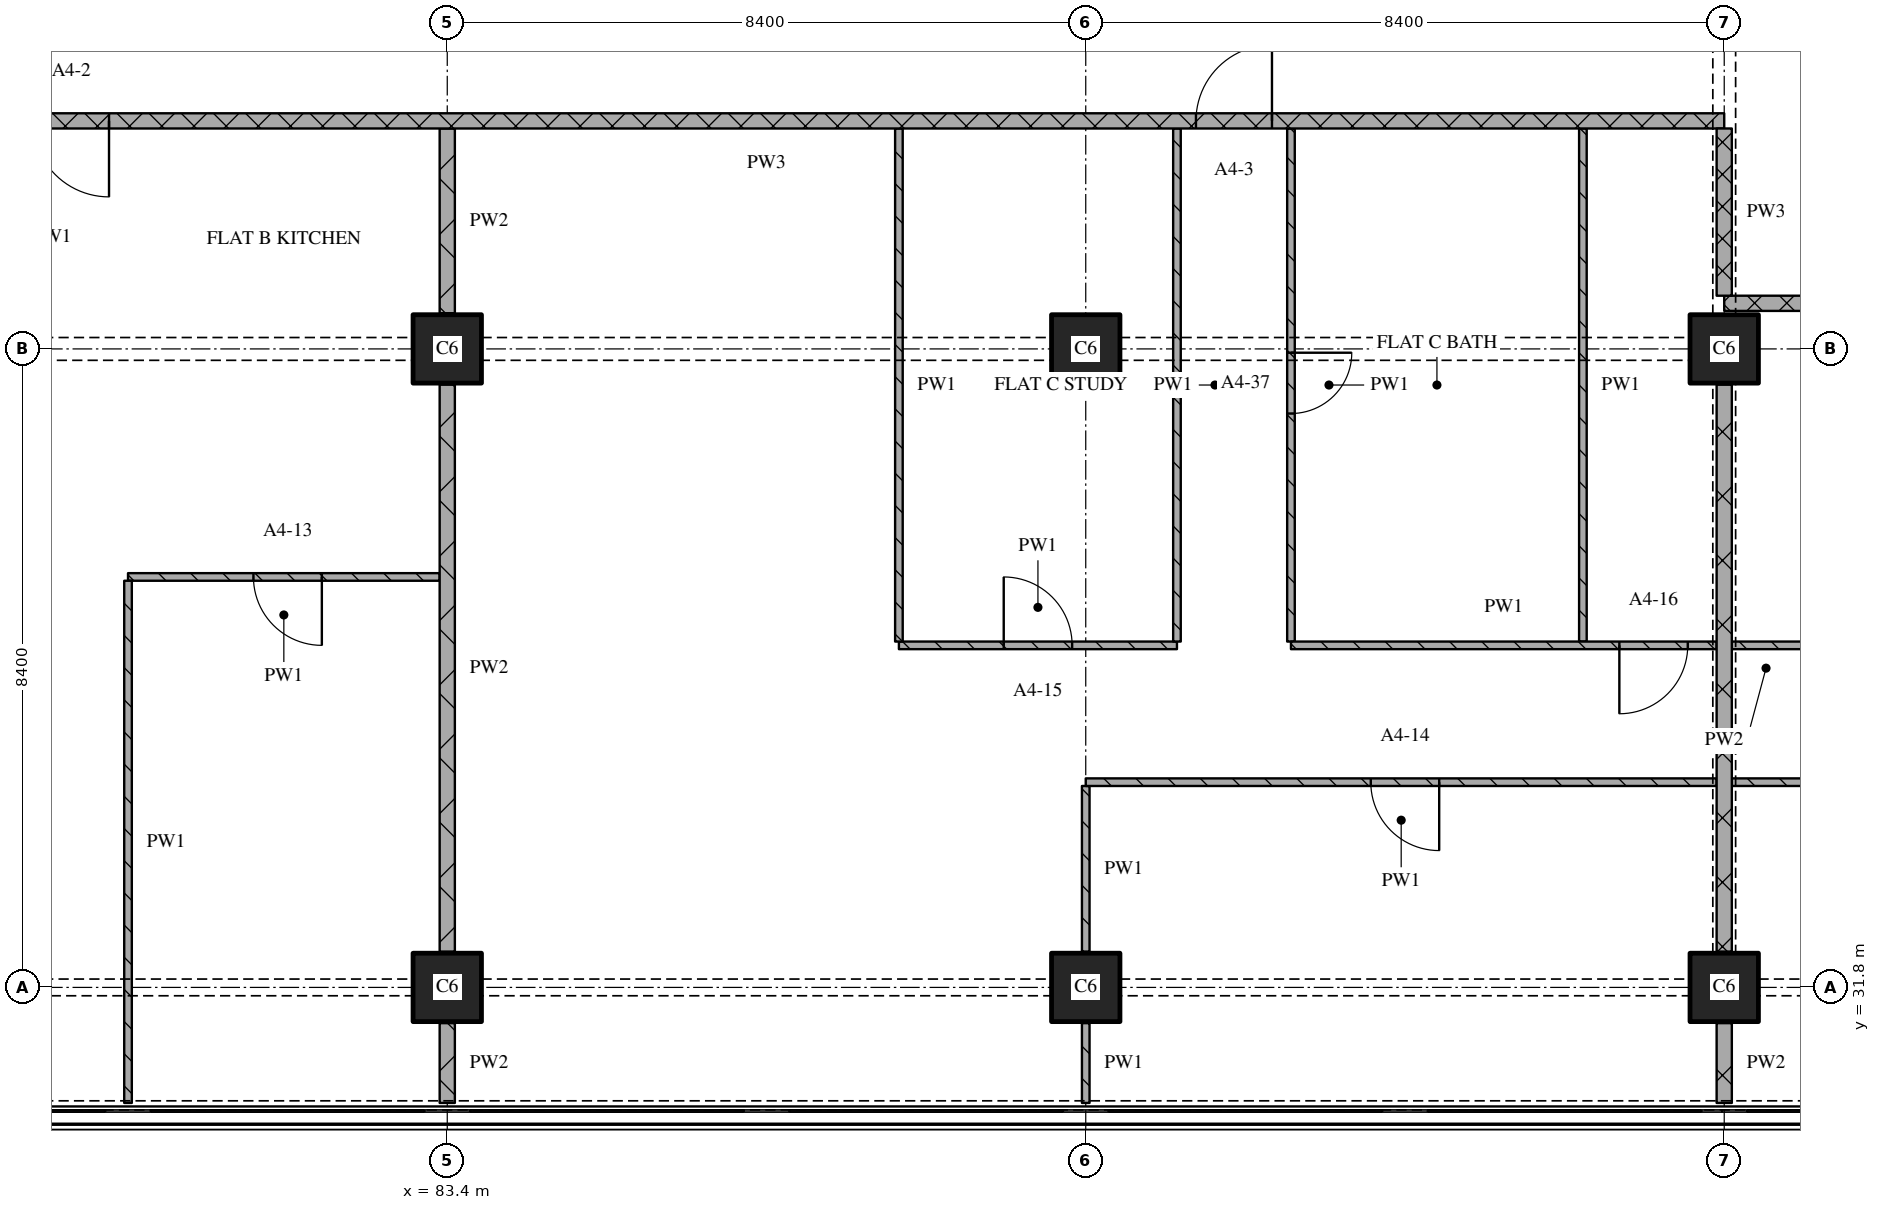
"""IFC4 building model, lengths in metres.
Left out: names, types, materials, properties, quantities, classifications, styles, units other than length and angle.
Written with IfcOpenShell. Run it as: python <this file> out.ifc"""

import sys

from ifc_helpers import new_model, si_unit, direction, frame, frame_2d, origin, origin_2d, place, context, subcontext, project, spatial, rectangle, extrude, element, fill, save


model = new_model("IFC4")
c1 = context("Model", 3, precision=1e-05, world=origin(), true_north=direction((0.0, 1.0)))
c2 = subcontext(c1, "Body", "Model", "MODEL_VIEW")
j1 = project(units=[si_unit("LENGTHUNIT", "METRE"), si_unit("PLANEANGLEUNIT", "RADIAN")], contexts=[c1])
p1 = place(None, origin())
s1 = spatial("IfcSite", under=j1, at=p1, CompositionType="ELEMENT")
p2 = place(p1, origin())
s2 = spatial("IfcBuilding", under=s1, at=p2, CompositionType="ELEMENT")
p3 = place(p2, frame((0.0, 0.0, 73.2)))
s3 = spatial("IfcBuildingStorey", under=s2, at=p3, CompositionType="ELEMENT", Elevation=73.2)
for number, where, z_axis, x_axis in (
    (1, (83.4, 31.8, 0.0), (0.0, 0.0, 1.0), (1.0, 0.0, 0.0)),
    (2, (83.4, 40.2, 0.0), (0.0, 0.0, 1.0), (1.0, 0.0, 0.0)),
    (3, (91.8, 31.8, 0.0), (0.0, 0.0, 1.0), (1.0, 0.0, 0.0)),
    (4, (91.8, 40.2, 0.0), (0.0, 0.0, 1.0), (1.0, 0.0, 0.0)),
    (5, (100.2, 31.8, 0.0), (0.0, 0.0, 1.0), (1.0, 0.0, 0.0)),
    (6, (100.2, 40.2, 0.0), (0.0, 0.0, 1.0), (1.0, 0.0, 0.0)),
):
    element("IfcColumn", number, at=place(p3, frame(where, z_axis=z_axis, x_axis=x_axis)), inside=s3, PredefinedType="COLUMN", context=c2, shape_type="SweptSolid", body=[
        extrude(rectangle(XDim=0.9, YDim=0.9, at=origin_2d()), origin(), (0.0, 0.0, 1.0), 3.6),
    ])
p4 = place(p3, frame((89.342, 36.3, 0.0), z_axis=(0.0, 0.0, 1.0), x_axis=(1.0, 0.0, 0.0)))
e7 = element("IfcWall", 7, at=p4, inside=s3, PredefinedType="PARTITIONING", context=c2, shape_type="SweptSolid", body=[
    extrude(rectangle(XDim=3.658, YDim=0.1, at=frame_2d((1.829, 0.0))), origin(), (0.0, 0.0, 1.0), 3.32),
])
p5 = place(p4, frame((1.379, 0.0, 0.0)))
e8 = element("IfcOpeningElement", 8, at=p5, cuts=e7, PredefinedType="OPENING", context=c2, shape_type="SweptSolid", body=[
    extrude(rectangle(XDim=0.9, YDim=2.1, at=frame_2d((0.45, 1.05))), frame((0.0, 0.06, 0.0), z_axis=(0.0, -1.0, 0.0), x_axis=(1.0, 0.0, 0.0)), (0.0, 0.0, 1.0), 0.12),
])
p6 = place(p3, frame((83.3, 37.2, 0.0), z_axis=(0.0, 0.0, 1.0), x_axis=(-1.0, 0.0, 0.0)))
e9 = element("IfcWall", 9, at=p6, inside=s3, PredefinedType="PARTITIONING", context=c2, shape_type="SweptSolid", body=[
    extrude(rectangle(XDim=4.1, YDim=0.1, at=frame_2d((2.05, 0.0))), origin(), (0.0, 0.0, 1.0), 3.32),
])
p7 = place(p6, frame((1.55, 0.0, 0.0)))
e10 = element("IfcOpeningElement", 10, at=p7, cuts=e9, PredefinedType="OPENING", context=c2, shape_type="SweptSolid", body=[
    extrude(rectangle(XDim=0.9, YDim=2.1, at=frame_2d((0.45, 1.05))), frame((0.0, 0.06, 0.0), z_axis=(0.0, -1.0, 0.0), x_axis=(1.0, 0.0, 0.0)), (0.0, 0.0, 1.0), 0.12),
])
p8 = place(p3, frame((124.28, 40.8, 0.0), z_axis=(0.0, 0.0, 1.0), x_axis=(-1.0, 0.0, 0.0)))
e11 = element("IfcWall", 11, at=p8, inside=s3, PredefinedType="PARTITIONING", context=c2, shape_type="SweptSolid", body=[
    extrude(rectangle(XDim=24.08, YDim=0.2, at=frame_2d((12.04, 0.0))), origin(), (0.0, 0.0, 1.0), 3.32),
])
p9 = place(p8, frame((12.03, 0.0, 0.0)))
e12 = element("IfcOpeningElement", 12, at=p9, cuts=e11, PredefinedType="OPENING", context=c2, shape_type="SweptSolid", body=[
    extrude(rectangle(XDim=1.0, YDim=2.1, at=frame_2d((0.5, 1.05))), frame((0.0, 0.11, 0.0), z_axis=(0.0, -1.0, 0.0), x_axis=(1.0, 0.0, 0.0)), (0.0, 0.0, 1.0), 0.22),
])
p10 = place(p3, frame((100.2, 43.2, 0.0), z_axis=(0.0, 0.0, 1.0), x_axis=(-1.0, 0.0, 0.0)))
e13 = element("IfcWall", 13, at=p10, inside=s3, PredefinedType="PARTITIONING", context=c2, shape_type="SweptSolid", body=[
    extrude(rectangle(XDim=25.2, YDim=0.2, at=frame_2d((12.6, 0.0))), origin(), (0.0, 0.0, 1.0), 3.32),
])
p11 = place(p10, frame((5.95, 0.0, 0.0)))
e14 = element("IfcOpeningElement", 14, at=p11, cuts=e13, PredefinedType="OPENING", context=c2, shape_type="SweptSolid", body=[
    extrude(rectangle(XDim=1.0, YDim=2.1, at=frame_2d((0.5, 1.05))), frame((0.0, 0.11, 0.0), z_axis=(0.0, -1.0, 0.0), x_axis=(1.0, 0.0, 0.0)), (0.0, 0.0, 1.0), 0.22),
])
p12 = place(p10, frame((21.25, 0.0, 0.0)))
e15 = element("IfcOpeningElement", 15, at=p12, cuts=e13, PredefinedType="OPENING", context=c2, shape_type="SweptSolid", body=[
    extrude(rectangle(XDim=1.0, YDim=2.1, at=frame_2d((0.5, 1.05))), frame((0.0, 0.11, 0.0), z_axis=(0.0, -1.0, 0.0), x_axis=(1.0, 0.0, 0.0)), (0.0, 0.0, 1.0), 0.22),
])
p13 = place(p3, frame((79.2, 37.15, 0.0), z_axis=(0.0, 0.0, 1.0), x_axis=(0.0, -1.0, 0.0)))
e16 = element("IfcWall", 16, at=p13, inside=s3, PredefinedType="PARTITIONING", context=c2, shape_type="SweptSolid", body=[
    extrude(rectangle(XDim=6.87, YDim=0.1, at=frame_2d((3.435, 0.0))), origin(), (0.0, 0.0, 1.0), 3.32),
])
p14 = place(p3, frame((83.4, 31.33, 0.0), z_axis=(0.0, 0.0, 1.0), x_axis=(0.0, -1.0, 0.0)))
e17 = element("IfcWall", 17, at=p14, inside=s3, PredefinedType="PARTITIONING", context=c2, shape_type="SweptSolid", body=[
    extrude(rectangle(XDim=1.05, YDim=0.2, at=frame_2d((0.525, 0.0))), origin(), (0.0, 0.0, 1.0), 3.32),
])
p15 = place(p3, frame((83.4, 39.73, 0.0), z_axis=(0.0, 0.0, 1.0), x_axis=(0.0, -1.0, 0.0)))
e18 = element("IfcWall", 18, at=p15, inside=s3, PredefinedType="PARTITIONING", context=c2, shape_type="SweptSolid", body=[
    extrude(rectangle(XDim=7.46, YDim=0.2, at=frame_2d((3.73, 0.0))), origin(), (0.0, 0.0, 1.0), 3.32),
])
p16 = place(p3, frame((83.4, 43.1, 0.0), z_axis=(0.0, 0.0, 1.0), x_axis=(0.0, -1.0, 0.0)))
e19 = element("IfcWall", 19, at=p16, inside=s3, PredefinedType="PARTITIONING", context=c2, shape_type="SweptSolid", body=[
    extrude(rectangle(XDim=2.43, YDim=0.2, at=frame_2d((1.215, 0.0))), origin(), (0.0, 0.0, 1.0), 3.32),
])
p17 = place(p3, frame((89.342, 43.1, 0.0), z_axis=(0.0, 0.0, 1.0), x_axis=(0.0, -1.0, 0.0)))
e20 = element("IfcWall", 20, at=p17, inside=s3, PredefinedType="PARTITIONING", context=c2, shape_type="SweptSolid", body=[
    extrude(rectangle(XDim=6.75, YDim=0.1, at=frame_2d((3.375, 0.0))), origin(), (0.0, 0.0, 1.0), 3.32),
])
p18 = place(p3, frame((91.8, 31.33, 0.0), z_axis=(0.0, 0.0, 1.0), x_axis=(0.0, -1.0, 0.0)))
e21 = element("IfcWall", 21, at=p18, inside=s3, PredefinedType="PARTITIONING", context=c2, shape_type="SweptSolid", body=[
    extrude(rectangle(XDim=1.05, YDim=0.1, at=frame_2d((0.525, 0.0))), origin(), (0.0, 0.0, 1.0), 3.32),
])
p19 = place(p3, frame((91.8, 34.45, 0.0), z_axis=(0.0, 0.0, 1.0), x_axis=(0.0, -1.0, 0.0)))
e22 = element("IfcWall", 22, at=p19, inside=s3, PredefinedType="PARTITIONING", context=c2, shape_type="SweptSolid", body=[
    extrude(rectangle(XDim=2.18, YDim=0.1, at=frame_2d((1.09, 0.0))), origin(), (0.0, 0.0, 1.0), 3.32),
])
p20 = place(p3, frame((93.0, 43.1, 0.0), z_axis=(0.0, 0.0, 1.0), x_axis=(0.0, -1.0, 0.0)))
e23 = element("IfcWall", 23, at=p20, inside=s3, PredefinedType="PARTITIONING", context=c2, shape_type="SweptSolid", body=[
    extrude(rectangle(XDim=6.75, YDim=0.1, at=frame_2d((3.375, 0.0))), origin(), (0.0, 0.0, 1.0), 3.32),
])
p21 = place(p3, frame((94.5, 43.1, 0.0), z_axis=(0.0, 0.0, 1.0), x_axis=(0.0, -1.0, 0.0)))
e24 = element("IfcWall", 24, at=p21, inside=s3, PredefinedType="PARTITIONING", context=c2, shape_type="SweptSolid", body=[
    extrude(rectangle(XDim=6.75, YDim=0.1, at=frame_2d((3.375, 0.0))), origin(), (0.0, 0.0, 1.0), 3.32),
])
p22 = place(p21, frame((2.95, 0.0, 0.0)))
e25 = element("IfcOpeningElement", 25, at=p22, cuts=e24, PredefinedType="OPENING", context=c2, shape_type="SweptSolid", body=[
    extrude(rectangle(XDim=0.8, YDim=2.1, at=frame_2d((0.4, 1.05))), frame((0.0, 0.06, 0.0), z_axis=(0.0, -1.0, 0.0), x_axis=(1.0, 0.0, 0.0)), (0.0, 0.0, 1.0), 0.12),
])
p23 = place(p3, frame((98.341, 43.1, 0.0), z_axis=(0.0, 0.0, 1.0), x_axis=(0.0, -1.0, 0.0)))
e26 = element("IfcWall", 26, at=p23, inside=s3, PredefinedType="PARTITIONING", context=c2, shape_type="SweptSolid", body=[
    extrude(rectangle(XDim=6.75, YDim=0.1, at=frame_2d((3.375, 0.0))), origin(), (0.0, 0.0, 1.0), 3.32),
])
p24 = place(p3, frame((100.2, 43.1, 0.0), z_axis=(0.0, 0.0, 1.0), x_axis=(0.0, -1.0, 0.0)))
e27 = element("IfcWall", 27, at=p24, inside=s3, PredefinedType="PARTITIONING", context=c2, shape_type="SweptSolid", body=[
    extrude(rectangle(XDim=2.2, YDim=0.2, at=frame_2d((1.1, 0.0))), origin(), (0.0, 0.0, 1.0), 2.43),
])
p25 = place(p3, frame((100.2, 31.33, 0.0), z_axis=(0.0, 0.0, 1.0), x_axis=(0.0, -1.0, 0.0)))
e28 = element("IfcWall", 28, at=p25, inside=s3, PredefinedType="PARTITIONING", context=c2, shape_type="SweptSolid", body=[
    extrude(rectangle(XDim=1.05, YDim=0.2, at=frame_2d((0.525, 0.0))), origin(), (0.0, 0.0, 1.0), 3.32),
])
p26 = place(p3, frame((100.2, 39.73, 0.0), z_axis=(0.0, 0.0, 1.0), x_axis=(0.0, -1.0, 0.0)))
e29 = element("IfcWall", 29, at=p26, inside=s3, PredefinedType="PARTITIONING", context=c2, shape_type="SweptSolid", body=[
    extrude(rectangle(XDim=7.46, YDim=0.2, at=frame_2d((3.73, 0.0))), origin(), (0.0, 0.0, 1.0), 2.83),
])
p27 = place(p3, frame((100.1, 34.5, 0.0), z_axis=(0.0, 0.0, 1.0), x_axis=(-1.0, 0.0, 0.0)))
e30 = element("IfcWall", 30, at=p27, inside=s3, PredefinedType="PARTITIONING", context=c2, shape_type="SweptSolid", body=[
    extrude(rectangle(XDim=8.3, YDim=0.1, at=frame_2d((4.15, 0.0))), origin(), (0.0, 0.0, 1.0), 3.32),
])
p28 = place(p27, frame((3.65, 0.0, 0.0)))
e31 = element("IfcOpeningElement", 31, at=p28, cuts=e30, PredefinedType="OPENING", context=c2, shape_type="SweptSolid", body=[
    extrude(rectangle(XDim=0.9, YDim=2.1, at=frame_2d((0.45, 1.05))), frame((0.0, 0.06, 0.0), z_axis=(0.0, -1.0, 0.0), x_axis=(1.0, 0.0, 0.0)), (0.0, 0.0, 1.0), 0.12),
])
p29 = place(p3, frame((117.0, 34.5, 0.0), z_axis=(0.0, 0.0, 1.0), x_axis=(-1.0, 0.0, 0.0)))
e32 = element("IfcWall", 32, at=p29, inside=s3, PredefinedType="PARTITIONING", context=c2, shape_type="SweptSolid", body=[
    extrude(rectangle(XDim=16.7, YDim=0.1, at=frame_2d((8.35, 0.0))), origin(), (0.0, 0.0, 1.0), 3.32),
])
p30 = place(p29, frame((7.95, 0.0, 0.0)))
e33 = element("IfcOpeningElement", 33, at=p30, cuts=e32, PredefinedType="OPENING", context=c2, shape_type="SweptSolid", body=[
    extrude(rectangle(XDim=0.9, YDim=2.1, at=frame_2d((0.45, 1.05))), frame((0.0, 0.06, 0.0), z_axis=(0.0, -1.0, 0.0), x_axis=(1.0, 0.0, 0.0)), (0.0, 0.0, 1.0), 0.12),
])
p31 = place(p29, frame((14.25, 0.0, 0.0)))
e34 = element("IfcOpeningElement", 34, at=p31, cuts=e32, PredefinedType="OPENING", context=c2, shape_type="SweptSolid", body=[
    extrude(rectangle(XDim=0.9, YDim=2.1, at=frame_2d((0.45, 1.05))), frame((0.0, 0.06, 0.0), z_axis=(0.0, -1.0, 0.0), x_axis=(1.0, 0.0, 0.0)), (0.0, 0.0, 1.0), 0.12),
])
p32 = place(p3, frame((94.5, 36.3, 0.0), z_axis=(0.0, 0.0, 1.0), x_axis=(1.0, 0.0, 0.0)))
e35 = element("IfcWall", 35, at=p32, inside=s3, PredefinedType="PARTITIONING", context=c2, shape_type="SweptSolid", body=[
    extrude(rectangle(XDim=5.6, YDim=0.1, at=frame_2d((2.8, 0.0))), origin(), (0.0, 0.0, 1.0), 3.32),
])
p33 = place(p32, frame((4.32, 0.0, 0.0)))
e36 = element("IfcOpeningElement", 36, at=p33, cuts=e35, PredefinedType="OPENING", context=c2, shape_type="SweptSolid", body=[
    extrude(rectangle(XDim=0.9, YDim=2.1, at=frame_2d((0.45, 1.05))), frame((0.0, 0.06, 0.0), z_axis=(0.0, -1.0, 0.0), x_axis=(1.0, 0.0, 0.0)), (0.0, 0.0, 1.0), 0.12),
])
p34 = place(p3, frame((100.3, 36.3, 0.0), z_axis=(0.0, 0.0, 1.0), x_axis=(1.0, 0.0, 0.0)))
e37 = element("IfcWall", 37, at=p34, inside=s3, PredefinedType="PARTITIONING", context=c2, shape_type="SweptSolid", body=[
    extrude(rectangle(XDim=10.7, YDim=0.1, at=frame_2d((5.35, 0.0))), origin(), (0.0, 0.0, 1.0), 3.32),
])
p35 = place(p34, frame((1.75, 0.0, 0.0)))
e38 = element("IfcOpeningElement", 38, at=p35, cuts=e37, PredefinedType="OPENING", context=c2, shape_type="SweptSolid", body=[
    extrude(rectangle(XDim=0.8, YDim=2.1, at=frame_2d((0.4, 1.05))), frame((0.0, 0.06, 0.0), z_axis=(0.0, -1.0, 0.0), x_axis=(1.0, 0.0, 0.0)), (0.0, 0.0, 1.0), 0.12),
])
p36 = place(p34, frame((6.25, 0.0, 0.0)))
e39 = element("IfcOpeningElement", 39, at=p36, cuts=e37, PredefinedType="OPENING", context=c2, shape_type="SweptSolid", body=[
    extrude(rectangle(XDim=0.8, YDim=2.1, at=frame_2d((0.4, 1.05))), frame((0.0, 0.06, 0.0), z_axis=(0.0, -1.0, 0.0), x_axis=(1.0, 0.0, 0.0)), (0.0, 0.0, 1.0), 0.12),
])
p37 = place(p5, origin())
e40 = element("IfcDoor", 40, at=p37, inside=s3, OperationType="SINGLE_SWING_LEFT", PredefinedType="DOOR", context=c2, shape_type="SweptSolid", body=[
    extrude(rectangle(XDim=0.9, YDim=2.1, at=frame_2d((0.45, 1.05))), frame((0.0, 0.025, 0.0), z_axis=(0.0, -1.0, 0.0), x_axis=(1.0, 0.0, 0.0)), (0.0, 0.0, 1.0), 0.05),
])
fill(e8, e40)
p38 = place(p7, origin())
e41 = element("IfcDoor", 41, at=p38, inside=s3, OperationType="SINGLE_SWING_LEFT", PredefinedType="DOOR", context=c2, shape_type="SweptSolid", body=[
    extrude(rectangle(XDim=0.9, YDim=2.1, at=frame_2d((0.45, 1.05))), frame((0.0, 0.025, 0.0), z_axis=(0.0, -1.0, 0.0), x_axis=(1.0, 0.0, 0.0)), (0.0, 0.0, 1.0), 0.05),
])
fill(e10, e41)
p39 = place(p11, origin())
e42 = element("IfcDoor", 42, at=p39, inside=s3, OperationType="SINGLE_SWING_RIGHT", PredefinedType="DOOR", context=c2, shape_type="SweptSolid", body=[
    extrude(rectangle(XDim=1.0, YDim=2.1, at=frame_2d((0.5, 1.05))), frame((0.0, 0.025, 0.0), z_axis=(0.0, -1.0, 0.0), x_axis=(1.0, 0.0, 0.0)), (0.0, 0.0, 1.0), 0.05),
])
fill(e14, e42)
p40 = place(p12, origin())
e43 = element("IfcDoor", 43, at=p40, inside=s3, OperationType="SINGLE_SWING_LEFT", PredefinedType="DOOR", context=c2, shape_type="SweptSolid", body=[
    extrude(rectangle(XDim=1.0, YDim=2.1, at=frame_2d((0.5, 1.05))), frame((0.0, 0.025, 0.0), z_axis=(0.0, -1.0, 0.0), x_axis=(1.0, 0.0, 0.0)), (0.0, 0.0, 1.0), 0.05),
])
fill(e15, e43)
p41 = place(p22, origin())
e44 = element("IfcDoor", 44, at=p41, inside=s3, OperationType="SINGLE_SWING_LEFT", PredefinedType="DOOR", context=c2, shape_type="SweptSolid", body=[
    extrude(rectangle(XDim=0.8, YDim=2.1, at=frame_2d((0.4, 1.05))), frame((0.0, 0.025, 0.0), z_axis=(0.0, -1.0, 0.0), x_axis=(1.0, 0.0, 0.0)), (0.0, 0.0, 1.0), 0.05),
])
fill(e25, e44)
p42 = place(p28, origin())
e45 = element("IfcDoor", 45, at=p42, inside=s3, OperationType="SINGLE_SWING_LEFT", PredefinedType="DOOR", context=c2, shape_type="SweptSolid", body=[
    extrude(rectangle(XDim=0.9, YDim=2.1, at=frame_2d((0.45, 1.05))), frame((0.0, 0.025, 0.0), z_axis=(0.0, -1.0, 0.0), x_axis=(1.0, 0.0, 0.0)), (0.0, 0.0, 1.0), 0.05),
])
fill(e31, e45)
p43 = place(p33, origin())
e46 = element("IfcDoor", 46, at=p43, inside=s3, OperationType="SINGLE_SWING_RIGHT", PredefinedType="DOOR", context=c2, shape_type="SweptSolid", body=[
    extrude(rectangle(XDim=0.9, YDim=2.1, at=frame_2d((0.45, 1.05))), frame((0.0, 0.025, 0.0), z_axis=(0.0, -1.0, 0.0), x_axis=(1.0, 0.0, 0.0)), (0.0, 0.0, 1.0), 0.05),
])
fill(e36, e46)
save(model, sys.argv[1])
